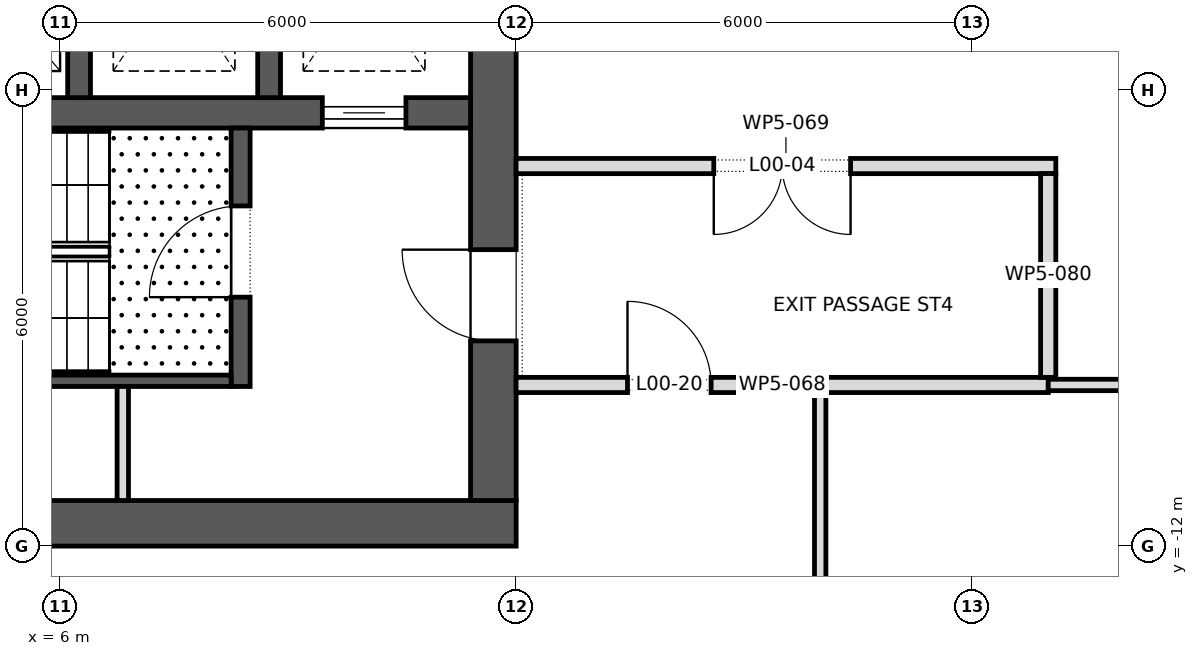
"""IFC4 building model, lengths in metres.
Left out: names, types, materials, properties, quantities, classifications, styles, units other than length and angle.
Written with IfcOpenShell. Run it as: python <this file> out.ifc"""

import sys

from ifc_helpers import new_model, si_unit, direction, frame, frame_2d, origin, place, context, subcontext, project, spatial, polyline, rectangle, outline, extrude, element, fill, save


model = new_model("IFC4")
c1 = context("Model", 3, precision=1e-05, world=origin(), true_north=direction((0.0, 1.0)))
c2 = subcontext(c1, "Body", "Model", "MODEL_VIEW")
j1 = project(units=[si_unit("LENGTHUNIT", "METRE"), si_unit("PLANEANGLEUNIT", "RADIAN")], contexts=[c1])
p1 = place(None, origin())
s1 = spatial("IfcSite", under=j1, at=p1, CompositionType="ELEMENT")
p2 = place(p1, origin())
s2 = spatial("IfcBuilding", under=s1, at=p2, CompositionType="ELEMENT")
p3 = place(p2, origin())
s3 = spatial("IfcBuildingStorey", under=s2, at=p3, CompositionType="ELEMENT", Elevation=0.0)
p4 = place(p3, frame((-12.0, -11.7, 0.0), z_axis=(0.0, 0.0, 1.0), x_axis=(1.0, 0.0, 0.0)))
e1 = element("IfcWall", 1, at=p4, inside=s3, PredefinedType="SHEAR", context=c2, shape_type="SweptSolid", body=[
    extrude(rectangle(XDim=24.0, YDim=0.6, at=frame_2d((12.0, 0.0))), origin(), (0.0, 0.0, 1.0), 7.0),
])
p5 = place(p4, frame((9.975, 0.0, 0.0)))
e2 = element("IfcOpeningElement", 2, at=p5, cuts=e1, PredefinedType="OPENING", context=c2, shape_type="SweptSolid", body=[
    extrude(rectangle(XDim=0.9, YDim=2.1, at=frame_2d((0.45, 1.05))), frame((0.0, 0.312, 0.0), z_axis=(0.0, -1.0, 0.0), x_axis=(1.0, 0.0, 0.0)), (0.0, 0.0, 1.0), 0.624),
])
p6 = place(p4, frame((3.8, 0.0, 0.0)))
e3 = element("IfcOpeningElement", 3, at=p6, cuts=e1, PredefinedType="OPENING", context=c2, shape_type="SweptSolid", body=[
    extrude(rectangle(XDim=0.8, YDim=2.1, at=frame_2d((0.4, 1.05))), frame((0.0, 0.312, 0.0), z_axis=(0.0, -1.0, 0.0), x_axis=(1.0, 0.0, 0.0)), (0.0, 0.0, 1.0), 0.624),
])
p7 = place(p4, frame((5.8, 0.0, 0.0)))
e4 = element("IfcOpeningElement", 4, at=p7, cuts=e1, PredefinedType="OPENING", context=c2, shape_type="SweptSolid", body=[
    extrude(rectangle(XDim=0.8, YDim=2.1, at=frame_2d((0.4, 1.05))), frame((0.0, 0.312, 0.0), z_axis=(0.0, -1.0, 0.0), x_axis=(1.0, 0.0, 0.0)), (0.0, 0.0, 1.0), 0.624),
])
p8 = place(p4, frame((7.5, 0.0, 0.0)))
e5 = element("IfcOpeningElement", 5, at=p8, cuts=e1, PredefinedType="OPENING", context=c2, shape_type="SweptSolid", body=[
    extrude(rectangle(XDim=0.8, YDim=2.1, at=frame_2d((0.4, 1.05))), frame((0.0, 0.312, 0.0), z_axis=(0.0, -1.0, 0.0), x_axis=(1.0, 0.0, 0.0)), (0.0, 0.0, 1.0), 0.624),
])
p9 = place(p4, frame((15.85, 0.0, 0.0)))
e6 = element("IfcOpeningElement", 6, at=p9, cuts=e1, PredefinedType="OPENING", context=c2, shape_type="SweptSolid", body=[
    extrude(rectangle(XDim=0.8, YDim=2.1, at=frame_2d((0.4, 1.05))), frame((0.0, 0.312, 0.0), z_axis=(0.0, -1.0, 0.0), x_axis=(1.0, 0.0, 0.0)), (0.0, 0.0, 1.0), 0.624),
])
p10 = place(p3, frame((11.7, -11.4, 0.0), z_axis=(0.0, 0.0, 1.0), x_axis=(0.0, 1.0, 0.0)))
e7 = element("IfcWall", 7, at=p10, inside=s3, PredefinedType="SHEAR", context=c2, shape_type="SweptSolid", body=[
    extrude(rectangle(XDim=22.8, YDim=0.6, at=frame_2d((11.4, 0.0))), origin(), (0.0, 0.0, 1.0), 7.0),
])
p11 = place(p10, frame((10.2, 0.0, 0.0)))
e8 = element("IfcOpeningElement", 8, at=p11, cuts=e7, PredefinedType="OPENING", context=c2, shape_type="SweptSolid", body=[
    extrude(rectangle(XDim=2.4, YDim=2.1, at=frame_2d((1.2, 1.05))), frame((0.0, 0.312, 0.0), z_axis=(0.0, -1.0, 0.0), x_axis=(1.0, 0.0, 0.0)), (0.0, 0.0, 1.0), 0.624),
])
p12 = place(p10, frame((19.5, 0.0, 0.0)))
e9 = element("IfcOpeningElement", 9, at=p12, cuts=e7, PredefinedType="OPENING", context=c2, shape_type="SweptSolid", body=[
    extrude(rectangle(XDim=1.2, YDim=2.1, at=frame_2d((0.6, 1.05))), frame((0.0, 0.312, 0.0), z_axis=(0.0, -1.0, 0.0), x_axis=(1.0, 0.0, 0.0)), (0.0, 0.0, 1.0), 0.624),
])
p13 = place(p10, frame((2.1, 0.0, 0.0)))
e10 = element("IfcOpeningElement", 10, at=p13, cuts=e7, PredefinedType="OPENING", context=c2, shape_type="SweptSolid", body=[
    extrude(rectangle(XDim=1.2, YDim=2.1, at=frame_2d((0.6, 1.05))), frame((0.0, 0.312, 0.0), z_axis=(0.0, -1.0, 0.0), x_axis=(1.0, 0.0, 0.0)), (0.0, 0.0, 1.0), 0.624),
])
p14 = place(p3, frame((-11.4, -6.3, 0.0), z_axis=(0.0, 0.0, 1.0), x_axis=(1.0, 0.0, 0.0)))
e11 = element("IfcWall", 11, at=p14, inside=s3, PredefinedType="SHEAR", context=c2, shape_type="SweptSolid", body=[
    extrude(rectangle(XDim=22.8, YDim=0.4, at=frame_2d((11.4, 0.0))), origin(), (0.0, 0.0, 1.0), 7.0),
])
p15 = place(p14, frame((20.85, 0.0, 0.0)))
e12 = element("IfcOpeningElement", 12, at=p15, cuts=e11, PredefinedType="OPENING", context=c2, shape_type="SweptSolid", body=[
    extrude(rectangle(XDim=1.1, YDim=2.1, at=frame_2d((0.55, 1.05))), frame((0.0, 0.212, 0.0), z_axis=(0.0, -1.0, 0.0), x_axis=(1.0, 0.0, 0.0)), (0.0, 0.0, 1.0), 0.424),
])
for number, where, z_axis, x_axis in (
    (13, (6.25, -6.1, 0.0), (0.0, 0.0, 1.0), (0.0, 1.0, 0.0)),
    (14, (8.75, -6.1, 0.0), (0.0, 0.0, 1.0), (0.0, 1.0, 0.0)),
):
    element("IfcWall", number, at=place(p3, frame(where, z_axis=z_axis, x_axis=x_axis)), inside=s3, PredefinedType="SHEAR", context=c2, shape_type="SweptSolid", body=[
        extrude(rectangle(XDim=2.9, YDim=0.3, at=frame_2d((1.45, 0.0))), origin(), (0.0, 0.0, 1.0), 7.0),
    ])
p16 = place(p3, frame((8.375, -9.9, 0.0), z_axis=(0.0, 0.0, 1.0), x_axis=(0.0, 1.0, 0.0)))
e15 = element("IfcWall", 15, at=p16, inside=s3, PredefinedType="SHEAR", context=c2, shape_type="SweptSolid", body=[
    extrude(rectangle(XDim=3.4, YDim=0.25, at=frame_2d((1.7, 0.0))), origin(), (0.0, 0.0, 1.0), 6.65),
])
p17 = place(p16, frame((1.175, 0.0, 0.0)))
e16 = element("IfcOpeningElement", 16, at=p17, cuts=e15, PredefinedType="OPENING", context=c2, shape_type="SweptSolid", body=[
    extrude(rectangle(XDim=1.2, YDim=2.1, at=frame_2d((0.6, 1.05))), frame((0.0, 0.137, 0.0), z_axis=(0.0, -1.0, 0.0), x_axis=(1.0, 0.0, 0.0)), (0.0, 0.0, 1.0), 0.274),
])
p18 = place(p3, frame((0.25, -9.825, 0.0), z_axis=(0.0, 0.0, 1.0), x_axis=(1.0, 0.0, 0.0)))
e17 = element("IfcWall", 17, at=p18, inside=s3, PredefinedType="SHEAR", context=c2, shape_type="SweptSolid", body=[
    extrude(rectangle(XDim=8.0, YDim=0.15, at=frame_2d((4.0, 0.0))), origin(), (0.0, 0.0, 1.0), 6.65),
])
p19 = place(p3, frame((6.825, -11.4, 0.0), z_axis=(0.0, 0.0, 1.0), x_axis=(0.0, 1.0, 0.0)))
e18 = element("IfcWall", 18, at=p19, inside=s3, PredefinedType="PARTITIONING", context=c2, shape_type="SweptSolid", body=[
    extrude(rectangle(XDim=1.5, YDim=0.15, at=frame_2d((0.75, 0.0))), origin(), (0.0, 0.0, 1.0), 6.65),
])
p20 = place(p3, frame((11.999, -9.88, 0.0), z_axis=(0.0, 0.0, 1.0), x_axis=(1.0, 0.0, 0.0)))
e19 = element("IfcWall", 19, at=p20, inside=s3, PredefinedType="PARTITIONING", context=c2, shape_type="SweptSolid", body=[
    extrude(rectangle(XDim=7.002, YDim=0.2, at=frame_2d((3.501, 0.0))), origin(), (0.0, 0.0, 1.0), 6.65),
])
p21 = place(p20, frame((1.466, 0.0, 0.0)))
e20 = element("IfcOpeningElement", 20, at=p21, cuts=e19, PredefinedType="OPENING", context=c2, shape_type="SweptSolid", body=[
    extrude(rectangle(XDim=1.1, YDim=2.1, at=frame_2d((0.55, 1.05))), frame((0.0, 0.112, 0.0), z_axis=(0.0, -1.0, 0.0), x_axis=(1.0, 0.0, 0.0)), (0.0, 0.0, 1.0), 0.224),
])
p22 = place(p3, frame((11.999, -7.0, 0.0), z_axis=(0.0, 0.0, 1.0), x_axis=(1.0, 0.0, 0.0)))
e21 = element("IfcWall", 21, at=p22, inside=s3, PredefinedType="PARTITIONING", context=c2, shape_type="SweptSolid", body=[
    extrude(rectangle(XDim=7.101, YDim=0.2, at=frame_2d((3.551, 0.0))), origin(), (0.0, 0.0, 1.0), 6.65),
])
p23 = place(p22, frame((2.601, 0.0, 0.0)))
e22 = element("IfcOpeningElement", 22, at=p23, cuts=e21, PredefinedType="OPENING", context=c2, shape_type="SweptSolid", body=[
    extrude(rectangle(XDim=1.8, YDim=2.1, at=frame_2d((0.9, 1.05))), frame((0.0, 0.112, 0.0), z_axis=(0.0, -1.0, 0.0), x_axis=(1.0, 0.0, 0.0)), (0.0, 0.0, 1.0), 0.224),
])
p24 = place(p3, frame((16.0, -9.98, 0.0), z_axis=(0.0, 0.0, 1.0), x_axis=(0.0, -1.0, 0.0)))
e23 = element("IfcWall", 23, at=p24, inside=s3, PredefinedType="PARTITIONING", context=c2, shape_type="SweptSolid", body=[
    extrude(rectangle(XDim=13.946, YDim=0.15, at=frame_2d((6.973, 0.0))), origin(), (0.0, 0.0, 1.0), 6.65),
])
p25 = place(p24, frame((5.76, 0.0, 0.0)))
e24 = element("IfcOpeningElement", 24, at=p25, cuts=e23, PredefinedType="OPENING", context=c2, shape_type="SweptSolid", body=[
    extrude(rectangle(XDim=2.4, YDim=2.1, at=frame_2d((1.2, 1.05))), frame((0.0, 0.087, 0.0), z_axis=(0.0, -1.0, 0.0), x_axis=(1.0, 0.0, 0.0)), (0.0, 0.0, 1.0), 0.174),
])
p26 = place(p3, frame((19.0, -7.099, 0.0), z_axis=(0.0, 0.0, 1.0), x_axis=(0.0, -1.0, 0.0)))
e25 = element("IfcWall", 25, at=p26, inside=s3, PredefinedType="PARTITIONING", context=c2, shape_type="SweptSolid", body=[
    extrude(rectangle(XDim=2.681, YDim=0.2, at=frame_2d((1.34, 0.0))), origin(), (0.0, 0.0, 1.0), 6.65),
])
p27 = place(p3, frame((35.65, -9.88, 0.0), z_axis=(0.0, 0.0, 1.0), x_axis=(-1.0, 0.0, 0.0)))
e26 = element("IfcWall", 26, at=p27, inside=s3, PredefinedType="PARTITIONING", context=c2, shape_type="SweptSolid", body=[
    extrude(outline(polyline([(-0.017, -0.075), (16.65, -0.075), (16.65, 0.075), (0.017, 0.075), (-0.017, -0.075)])), origin(), (0.0, 0.0, 1.0), 6.65),
])
p28 = place(p27, frame((7.445, 0.0, 0.0)))
e27 = element("IfcOpeningElement", 27, at=p28, cuts=e26, PredefinedType="OPENING", context=c2, shape_type="SweptSolid", body=[
    extrude(rectangle(XDim=1.8, YDim=2.1, at=frame_2d((0.9, 1.05))), frame((0.0, 0.087, 0.0), z_axis=(0.0, -1.0, 0.0), x_axis=(1.0, 0.0, 0.0)), (0.0, 0.0, 1.0), 0.174),
])
p29 = place(p15, origin())
e28 = element("IfcDoor", 28, at=p29, inside=s3, OperationType="SLIDING_TO_LEFT", PredefinedType="DOOR", context=c2, shape_type="SweptSolid", body=[
    extrude(rectangle(XDim=1.1, YDim=2.1, at=frame_2d((0.55, 1.05))), frame((0.0, 0.025, 0.0), z_axis=(0.0, -1.0, 0.0), x_axis=(1.0, 0.0, 0.0)), (0.0, 0.0, 1.0), 0.05),
])
fill(e12, e28)
p30 = place(p17, origin())
e29 = element("IfcDoor", 29, at=p30, inside=s3, OperationType="SINGLE_SWING_RIGHT", PredefinedType="DOOR", context=c2, shape_type="SweptSolid", body=[
    extrude(rectangle(XDim=1.2, YDim=2.1, at=frame_2d((0.6, 1.05))), frame((0.0, 0.025, 0.0), z_axis=(0.0, -1.0, 0.0), x_axis=(1.0, 0.0, 0.0)), (0.0, 0.0, 1.0), 0.05),
])
fill(e16, e29)
p31 = place(p13, origin())
e30 = element("IfcDoor", 30, at=p31, inside=s3, OperationType="SINGLE_SWING_LEFT", PredefinedType="DOOR", context=c2, shape_type="SweptSolid", body=[
    extrude(rectangle(XDim=1.2, YDim=2.1, at=frame_2d((0.6, 1.05))), frame((0.0, 0.025, 0.0), z_axis=(0.0, -1.0, 0.0), x_axis=(1.0, 0.0, 0.0)), (0.0, 0.0, 1.0), 0.05),
])
fill(e10, e30)
p32 = place(p23, frame((1.8, 0.0, 0.0), z_axis=(0.0, 0.0, 1.0), x_axis=(-1.0, 0.0, 0.0)))
e31 = element("IfcDoor", 31, at=p32, inside=s3, OperationType="DOUBLE_DOOR_SINGLE_SWING", PredefinedType="DOOR", context=c2, shape_type="SweptSolid", body=[
    extrude(rectangle(XDim=1.8, YDim=2.1, at=frame_2d((0.9, 1.05))), frame((0.0, 0.025, 0.0), z_axis=(0.0, -1.0, 0.0), x_axis=(1.0, 0.0, 0.0)), (0.0, 0.0, 1.0), 0.05),
])
fill(e22, e31)
p33 = place(p21, origin())
e32 = element("IfcDoor", 32, at=p33, inside=s3, OperationType="SINGLE_SWING_RIGHT", PredefinedType="DOOR", context=c2, shape_type="SweptSolid", body=[
    extrude(rectangle(XDim=1.1, YDim=2.1, at=frame_2d((0.55, 1.05))), frame((0.0, 0.025, 0.0), z_axis=(0.0, -1.0, 0.0), x_axis=(1.0, 0.0, 0.0)), (0.0, 0.0, 1.0), 0.05),
])
fill(e20, e32)
save(model, sys.argv[1])
